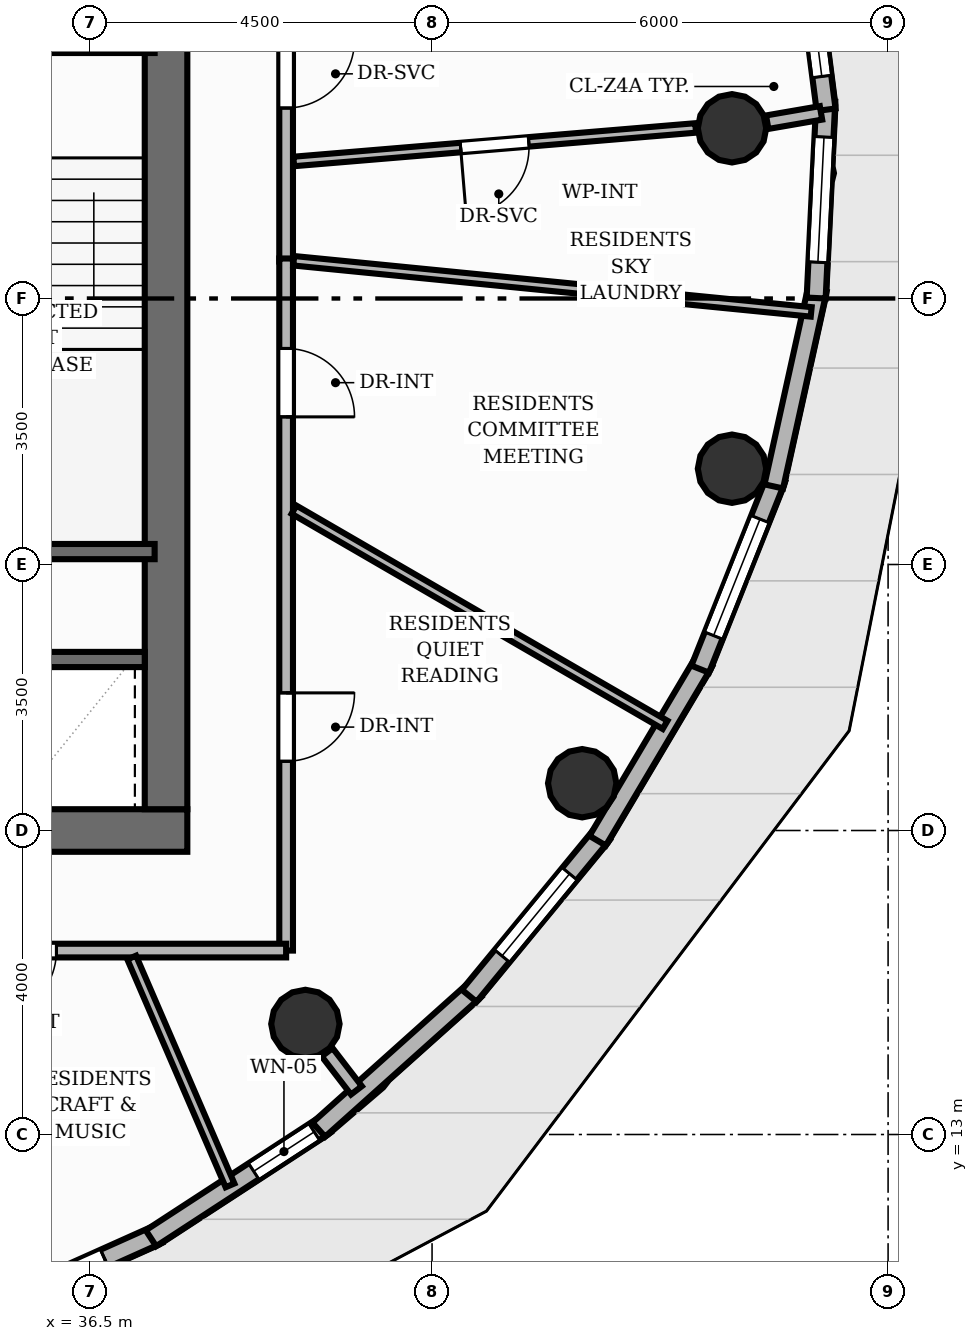
"""IFC4 building model, lengths in metres.
Left out: names, types, materials, properties, quantities, classifications, styles, units other than length and angle.
Written with IfcOpenShell. Run it as: python <this file> out.ifc"""

import sys

from ifc_helpers import new_model, si_unit, direction, frame, frame_2d, origin, origin_2d, place, context, subcontext, project, spatial, rectangle, circle, extrude, element, fill, save


model = new_model("IFC4")
c1 = context("Model", 3, precision=1e-05, world=origin(), true_north=direction((0.0, 1.0)))
c2 = subcontext(c1, "Body", "Model", "MODEL_VIEW")
j1 = project(units=[si_unit("LENGTHUNIT", "METRE"), si_unit("PLANEANGLEUNIT", "RADIAN")], contexts=[c1])
p1 = place(None, origin())
s1 = spatial("IfcSite", under=j1, at=p1, CompositionType="ELEMENT")
p2 = place(p1, origin())
s2 = spatial("IfcBuilding", under=s1, at=p2, CompositionType="ELEMENT")
p3 = place(p2, frame((0.0, 0.0, 191.84)))
s3 = spatial("IfcBuildingStorey", under=s2, at=p3, CompositionType="ELEMENT", Elevation=191.84)
p4 = place(p3, frame((26.22, 17.0, 0.0), z_axis=(0.0, 0.0, 1.0), x_axis=(1.0, 0.0, 0.0)))
e1 = element("IfcWall", 1, at=p4, inside=s3, PredefinedType="SHEAR", context=c2, shape_type="SweptSolid", body=[
    extrude(rectangle(XDim=11.56, YDim=0.56, at=frame_2d((5.78, 0.0))), origin(), (0.0, 0.0, 1.0), 3.2),
])
p5 = place(p4, frame((2.28, 0.0, 0.0)))
e2 = element("IfcOpeningElement", 2, at=p5, cuts=e1, PredefinedType="OPENING", context=c2, shape_type="SweptSolid", body=[
    extrude(rectangle(XDim=1.1, YDim=2.15, at=frame_2d((0.55, 1.075))), frame((0.0, 0.29, 0.0), z_axis=(0.0, -1.0, 0.0), x_axis=(1.0, 0.0, 0.0)), (0.0, 0.0, 1.0), 0.58),
])
p6 = place(p4, frame((5.83, 0.0, 0.0)))
e3 = element("IfcOpeningElement", 3, at=p6, cuts=e1, PredefinedType="OPENING", context=c2, shape_type="SweptSolid", body=[
    extrude(rectangle(XDim=0.9, YDim=2.1, at=frame_2d((0.45, 1.05))), frame((0.0, 0.29, 0.0), z_axis=(0.0, -1.0, 0.0), x_axis=(1.0, 0.0, 0.0)), (0.0, 0.0, 1.0), 0.58),
])
p7 = place(p3, frame((37.5, 17.28, 0.0), z_axis=(0.0, 0.0, 1.0), x_axis=(0.0, 1.0, 0.0)))
e4 = element("IfcWall", 4, at=p7, inside=s3, PredefinedType="SHEAR", context=c2, shape_type="SweptSolid", body=[
    extrude(rectangle(XDim=13.44, YDim=0.56, at=frame_2d((6.72, 0.0))), origin(), (0.0, 0.0, 1.0), 3.2),
])
for number, where, z_axis, x_axis in (
    (5, (44.946, 26.24, 0.0), (0.0, 0.0, 1.0), (1.0, 0.0, 0.0)),
    (6, (39.333, 14.455, 0.0), (0.0, 0.0, 1.0), (1.0, 0.0, 0.0)),
    (7, (42.975, 17.622, 0.0), (0.0, 0.0, 1.0), (1.0, 0.0, 0.0)),
    (8, (44.946, 21.76, 0.0), (0.0, 0.0, 1.0), (1.0, 0.0, 0.0)),
):
    element("IfcColumn", number, at=place(p3, frame(where, z_axis=z_axis, x_axis=x_axis)), inside=s3, PredefinedType="COLUMN", context=c2, shape_type="SweptSolid", body=[
        extrude(circle(Radius=0.45, at=origin_2d()), origin(), (0.0, 0.0, 1.0), 3.2),
    ])
p8 = place(p3, frame((37.397, 11.687, 0.0), z_axis=(0.0, 0.0, 1.0), x_axis=(-0.912615139532, -0.408819773368, 0.0)))
e9 = element("IfcWall", 9, at=p8, inside=s3, PredefinedType="SOLIDWALL", context=c2, shape_type="SweptSolid", body=[
    extrude(rectangle(XDim=2.702, YDim=0.25, at=frame_2d((1.351, 0.0))), origin(), (0.0, 0.0, 1.0), 2.96),
])
p9 = place(p8, frame((0.776, 0.0, 0.0)))
e10 = element("IfcOpeningElement", 10, at=p9, cuts=e9, PredefinedType="OPENING", context=c2, shape_type="SweptSolid", body=[
    extrude(rectangle(XDim=1.15, YDim=2.2, at=frame_2d((0.575, 1.1))), frame((0.0, 0.135, 0.0), z_axis=(0.0, -1.0, 0.0), x_axis=(1.0, 0.0, 0.0)), (0.0, 0.0, 1.0), 0.27),
])
p10 = place(p3, frame((39.596, 13.13, 0.0), z_axis=(0.0, 0.0, 1.0), x_axis=(-0.837860586987, -0.545884270496, 0.0)))
e11 = element("IfcWall", 11, at=p10, inside=s3, PredefinedType="SOLIDWALL", context=c2, shape_type="SweptSolid", body=[
    extrude(rectangle(XDim=2.739, YDim=0.25, at=frame_2d((1.369, 0.0))), origin(), (0.0, 0.0, 1.0), 2.96),
])
p11 = place(p10, frame((0.175, 0.0, 0.85)))
e12 = element("IfcOpeningElement", 12, at=p11, cuts=e11, PredefinedType="OPENING", context=c2, shape_type="SweptSolid", body=[
    extrude(rectangle(XDim=0.95, YDim=1.45, at=frame_2d((0.475, 0.725))), frame((0.0, 0.135, 0.0), z_axis=(0.0, -1.0, 0.0), x_axis=(1.0, 0.0, 0.0)), (0.0, 0.0, 1.0), 0.27),
])
p12 = place(p3, frame((41.564, 14.904, 0.0), z_axis=(0.0, 0.0, 1.0), x_axis=(-0.744898573364, -0.667177723998, 0.0)))
e13 = element("IfcWall", 13, at=p12, inside=s3, PredefinedType="SOLIDWALL", context=c2, shape_type="SweptSolid", body=[
    extrude(rectangle(XDim=2.758, YDim=0.25, at=frame_2d((1.379, 0.0))), origin(), (0.0, 0.0, 1.0), 2.96),
])
p13 = place(p3, frame((43.241, 16.955, 0.0), z_axis=(0.0, 0.0, 1.0), x_axis=(-0.635409334306, -0.772175483861, 0.0)))
e14 = element("IfcWall", 14, at=p13, inside=s3, PredefinedType="SOLIDWALL", context=c2, shape_type="SweptSolid", body=[
    extrude(rectangle(XDim=2.758, YDim=0.25, at=frame_2d((1.379, 0.0))), origin(), (0.0, 0.0, 1.0), 2.96),
])
p14 = place(p13, frame((0.679, 0.0, 0.85)))
e15 = element("IfcOpeningElement", 15, at=p14, cuts=e14, PredefinedType="OPENING", context=c2, shape_type="SweptSolid", body=[
    extrude(rectangle(XDim=1.4, YDim=1.55, at=frame_2d((0.7, 0.775))), frame((0.0, 0.135, 0.0), z_axis=(0.0, -1.0, 0.0), x_axis=(1.0, 0.0, 0.0)), (0.0, 0.0, 1.0), 0.27),
])
p15 = place(p3, frame((44.576, 19.221, 0.0), z_axis=(0.0, 0.0, 1.0), x_axis=(-0.510320389621, -0.859984360287, 0.0)))
e16 = element("IfcWall", 16, at=p15, inside=s3, PredefinedType="SOLIDWALL", context=c2, shape_type="SweptSolid", body=[
    extrude(rectangle(XDim=2.738, YDim=0.25, at=frame_2d((1.369, 0.0))), origin(), (0.0, 0.0, 1.0), 2.96),
])
p16 = place(p3, frame((45.528, 21.633, 0.0), z_axis=(0.0, 0.0, 1.0), x_axis=(-0.370330939431, -0.928899884433, 0.0)))
e17 = element("IfcWall", 17, at=p16, inside=s3, PredefinedType="SOLIDWALL", context=c2, shape_type="SweptSolid", body=[
    extrude(rectangle(XDim=2.702, YDim=0.25, at=frame_2d((1.351, 0.0))), origin(), (0.0, 0.0, 1.0), 2.96),
])
p17 = place(p16, frame((0.576, 0.0, 0.85)))
e18 = element("IfcOpeningElement", 18, at=p17, cuts=e17, PredefinedType="OPENING", context=c2, shape_type="SweptSolid", body=[
    extrude(rectangle(XDim=1.65, YDim=1.55, at=frame_2d((0.825, 0.775))), frame((0.0, 0.135, 0.0), z_axis=(0.0, -1.0, 0.0), x_axis=(1.0, 0.0, 0.0)), (0.0, 0.0, 1.0), 0.27),
])
p18 = place(p3, frame((46.068, 24.116, 0.0), z_axis=(0.0, 0.0, 1.0), x_axis=(-0.215877166516, -0.976420528756, 0.0)))
e19 = element("IfcWall", 19, at=p18, inside=s3, PredefinedType="SOLIDWALL", context=c2, shape_type="SweptSolid", body=[
    extrude(rectangle(XDim=2.651, YDim=0.25, at=frame_2d((1.325, 0.0))), origin(), (0.0, 0.0, 1.0), 2.96),
])
p19 = place(p3, frame((46.18, 26.595, 0.0), z_axis=(0.0, 0.0, 1.0), x_axis=(-0.048688181414, -0.99881402723, 0.0)))
e20 = element("IfcWall", 20, at=p19, inside=s3, PredefinedType="SOLIDWALL", context=c2, shape_type="SweptSolid", body=[
    extrude(rectangle(XDim=2.593, YDim=0.25, at=frame_2d((1.296, 0.0))), origin(), (0.0, 0.0, 1.0), 2.96),
])
p20 = place(p19, frame((0.471, 0.0, 0.85)))
e21 = element("IfcOpeningElement", 21, at=p20, cuts=e20, PredefinedType="OPENING", context=c2, shape_type="SweptSolid", body=[
    extrude(rectangle(XDim=1.65, YDim=1.55, at=frame_2d((0.825, 0.775))), frame((0.0, 0.135, 0.0), z_axis=(0.0, -1.0, 0.0), x_axis=(1.0, 0.0, 0.0)), (0.0, 0.0, 1.0), 0.27),
])
p21 = place(p3, frame((45.86, 28.995, 0.0), z_axis=(0.0, 0.0, 1.0), x_axis=(0.128057007482, -0.991766808698, 0.0)))
e22 = element("IfcWall", 22, at=p21, inside=s3, PredefinedType="SOLIDWALL", context=c2, shape_type="SweptSolid", body=[
    extrude(rectangle(XDim=2.532, YDim=0.25, at=frame_2d((1.266, 0.0))), origin(), (0.0, 0.0, 1.0), 2.96),
])
p22 = place(p21, frame((0.441, 0.0, 0.85)))
e23 = element("IfcOpeningElement", 23, at=p22, cuts=e22, PredefinedType="OPENING", context=c2, shape_type="SweptSolid", body=[
    extrude(rectangle(XDim=1.65, YDim=1.55, at=frame_2d((0.825, 0.775))), frame((0.0, 0.135, 0.0), z_axis=(0.0, -1.0, 0.0), x_axis=(1.0, 0.0, 0.0)), (0.0, 0.0, 1.0), 0.27),
])
p23 = place(p3, frame((34.11, 20.67, 0.0), z_axis=(0.0, 0.0, 1.0), x_axis=(1.0, 0.0, 0.0)))
e24 = element("IfcWall", 24, at=p23, inside=s3, PredefinedType="SHEAR", context=c2, shape_type="SweptSolid", body=[
    extrude(rectangle(XDim=3.24, YDim=0.2, at=frame_2d((1.62, 0.0))), origin(), (0.0, 0.0, 1.0), 3.2),
])
p24 = place(p3, frame((34.11, 27.33, 0.0), z_axis=(0.0, 0.0, 1.0), x_axis=(1.0, 0.0, 0.0)))
e25 = element("IfcWall", 25, at=p24, inside=s3, PredefinedType="SHEAR", context=c2, shape_type="SweptSolid", body=[
    extrude(rectangle(XDim=3.24, YDim=0.2, at=frame_2d((1.62, 0.0))), origin(), (0.0, 0.0, 1.0), 3.2),
])
p25 = place(p24, frame((1.135, 0.0, 0.0)))
e26 = element("IfcOpeningElement", 26, at=p25, cuts=e25, PredefinedType="OPENING", context=c2, shape_type="SweptSolid", body=[
    extrude(rectangle(XDim=1.05, YDim=2.15, at=frame_2d((0.525, 1.075))), frame((0.0, 0.11, 0.0), z_axis=(0.0, -1.0, 0.0), x_axis=(1.0, 0.0, 0.0)), (0.0, 0.0, 1.0), 0.22),
])
p26 = place(p3, frame((33.5, 19.25, 0.0), z_axis=(0.0, 0.0, 1.0), x_axis=(1.0, 0.0, 0.0)))
e27 = element("IfcWall", 27, at=p26, inside=s3, PredefinedType="SHEAR", context=c2, shape_type="SweptSolid", body=[
    extrude(rectangle(XDim=3.72, YDim=0.2, at=frame_2d((1.86, 0.0))), origin(), (0.0, 0.0, 1.0), 3.2),
])
p27 = place(p3, frame((45.409, 26.32, 0.0), z_axis=(0.0, 0.0, 1.0), x_axis=(0.985336223431, 0.170623933826, 0.0)))
e28 = element("IfcWall", 28, at=p27, inside=s3, PredefinedType="PARTITIONING", context=c2, shape_type="SweptSolid", body=[
    extrude(rectangle(XDim=0.718, YDim=0.18, at=frame_2d((0.359, 0.0))), origin(), (0.0, 0.0, 1.0), 2.403),
])
p28 = place(p3, frame((39.62, 14.082, 0.0), z_axis=(0.0, 0.0, 1.0), x_axis=(0.609112888366, -0.793083532314, 0.0)))
e29 = element("IfcWall", 29, at=p28, inside=s3, PredefinedType="PARTITIONING", context=c2, shape_type="SweptSolid", body=[
    extrude(rectangle(XDim=0.632, YDim=0.18, at=frame_2d((0.316, 0.0))), origin(), (0.0, 0.0, 1.0), 2.403),
])
p29 = place(p3, frame((39.08, 32.58, 0.0), z_axis=(0.0, 0.0, 1.0), x_axis=(0.0, -1.0, 0.0)))
e30 = element("IfcWall", 30, at=p29, inside=s3, PredefinedType="PARTITIONING", context=c2, shape_type="SweptSolid", body=[
    extrude(rectangle(XDim=8.094, YDim=0.18, at=frame_2d((4.047, 0.0))), origin(), (0.0, 0.0, 1.0), 2.955),
])
p30 = place(p29, frame((5.174, 0.0, 0.0)))
e31 = element("IfcOpeningElement", 31, at=p30, cuts=e30, PredefinedType="OPENING", context=c2, shape_type="SweptSolid", body=[
    extrude(rectangle(XDim=0.9, YDim=2.1, at=frame_2d((0.45, 1.05))), frame((0.0, 0.1, 0.0), z_axis=(0.0, -1.0, 0.0), x_axis=(1.0, 0.0, 0.0)), (0.0, 0.0, 1.0), 0.2),
])
p31 = place(p3, frame((39.08, 24.526, 0.0), z_axis=(0.0, 0.0, 1.0), x_axis=(0.0, -1.0, 0.0)))
e32 = element("IfcWall", 32, at=p31, inside=s3, PredefinedType="PARTITIONING", context=c2, shape_type="SweptSolid", body=[
    extrude(rectangle(XDim=9.106, YDim=0.18, at=frame_2d((4.553, 0.0))), origin(), (0.0, 0.0, 1.0), 2.955),
])
p32 = place(p31, frame((1.184, 0.0, 0.0)))
e33 = element("IfcOpeningElement", 33, at=p32, cuts=e32, PredefinedType="OPENING", context=c2, shape_type="SweptSolid", body=[
    extrude(rectangle(XDim=0.9, YDim=2.1, at=frame_2d((0.45, 1.05))), frame((0.0, 0.1, 0.0), z_axis=(0.0, -1.0, 0.0), x_axis=(1.0, 0.0, 0.0)), (0.0, 0.0, 1.0), 0.2),
])
p33 = place(p31, frame((5.716, 0.0, 0.0)))
e34 = element("IfcOpeningElement", 34, at=p33, cuts=e32, PredefinedType="OPENING", context=c2, shape_type="SweptSolid", body=[
    extrude(rectangle(XDim=0.9, YDim=2.1, at=frame_2d((0.45, 1.05))), frame((0.0, 0.1, 0.0), z_axis=(0.0, -1.0, 0.0), x_axis=(1.0, 0.0, 0.0)), (0.0, 0.0, 1.0), 0.2),
])
p34 = place(p3, frame((39.08, 15.42, 0.0), z_axis=(0.0, 0.0, 1.0), x_axis=(-1.0, 0.0, 0.0)))
e35 = element("IfcWall", 35, at=p34, inside=s3, PredefinedType="PARTITIONING", context=c2, shape_type="SweptSolid", body=[
    extrude(rectangle(XDim=10.594, YDim=0.18, at=frame_2d((5.297, 0.0))), origin(), (0.0, 0.0, 1.0), 2.955),
])
p35 = place(p34, frame((3.021, 0.0, 0.0)))
e36 = element("IfcOpeningElement", 36, at=p35, cuts=e35, PredefinedType="OPENING", context=c2, shape_type="SweptSolid", body=[
    extrude(rectangle(XDim=0.9, YDim=2.1, at=frame_2d((0.45, 1.05))), frame((0.0, 0.1, 0.0), z_axis=(0.0, -1.0, 0.0), x_axis=(1.0, 0.0, 0.0)), (0.0, 0.0, 1.0), 0.2),
])
p36 = place(p34, frame((6.508, 0.0, 0.0)))
e37 = element("IfcOpeningElement", 37, at=p36, cuts=e35, PredefinedType="OPENING", context=c2, shape_type="SweptSolid", body=[
    extrude(rectangle(XDim=0.9, YDim=2.1, at=frame_2d((0.45, 1.05))), frame((0.0, 0.1, 0.0), z_axis=(0.0, -1.0, 0.0), x_axis=(1.0, 0.0, 0.0)), (0.0, 0.0, 1.0), 0.2),
])
p37 = place(p3, frame((44.468, 26.244, 0.0), z_axis=(0.0, 0.0, 1.0), x_axis=(-0.996538774807, -0.083129238578, 0.0)))
e38 = element("IfcWall", 38, at=p37, inside=s3, PredefinedType="PARTITIONING", context=c2, shape_type="SweptSolid", body=[
    extrude(rectangle(XDim=5.307, YDim=0.125, at=frame_2d((2.653, 0.0))), origin(), (0.0, 0.0, 1.0), 2.403),
])
p38 = place(p37, frame((2.204, 0.0, 0.0)))
e39 = element("IfcOpeningElement", 39, at=p38, cuts=e38, PredefinedType="OPENING", context=c2, shape_type="SweptSolid", body=[
    extrude(rectangle(XDim=0.9, YDim=2.1, at=frame_2d((0.45, 1.05))), frame((0.0, 0.073, 0.0), z_axis=(0.0, -1.0, 0.0), x_axis=(1.0, 0.0, 0.0)), (0.0, 0.0, 1.0), 0.145),
])
p39 = place(p3, frame((44.066, 18.39, 0.0), z_axis=(0.0, 0.0, 1.0), x_axis=(-0.865092390625, 0.501612555348, 0.0)))
e40 = element("IfcWall", 40, at=p39, inside=s3, PredefinedType="PARTITIONING", context=c2, shape_type="SweptSolid", body=[
    extrude(rectangle(XDim=5.643, YDim=0.125, at=frame_2d((2.822, 0.0))), origin(), (0.0, 0.0, 1.0), 2.692),
])
p40 = place(p3, frame((39.179, 24.497, 0.0), z_axis=(0.0, 0.0, 1.0), x_axis=(0.995152744832, -0.098341316102, 0.0)))
e41 = element("IfcWall", 41, at=p40, inside=s3, PredefinedType="PARTITIONING", context=c2, shape_type="SweptSolid", body=[
    extrude(rectangle(XDim=6.842, YDim=0.125, at=frame_2d((3.421, 0.0))), origin(), (0.0, 0.0, 1.0), 2.692),
])
p41 = place(p3, frame((38.342, 12.331, 0.0), z_axis=(0.0, 0.0, 1.0), x_axis=(-0.396192482216, 0.918167477662, 0.0)))
e42 = element("IfcWall", 42, at=p41, inside=s3, PredefinedType="PARTITIONING", context=c2, shape_type="SweptSolid", body=[
    extrude(rectangle(XDim=3.265, YDim=0.125, at=frame_2d((1.632, 0.0))), origin(), (0.0, 0.0, 1.0), 2.692),
])
p42 = place(p9, origin())
e43 = element("IfcDoor", 43, at=p42, inside=s3, OperationType="SINGLE_SWING_LEFT", PredefinedType="DOOR", context=c2, shape_type="SweptSolid", body=[
    extrude(rectangle(XDim=1.15, YDim=2.2, at=frame_2d((0.575, 1.1))), frame((0.0, 0.025, 0.0), z_axis=(0.0, -1.0, 0.0), x_axis=(1.0, 0.0, 0.0)), (0.0, 0.0, 1.0), 0.05),
])
fill(e10, e43)
p43 = place(p11, origin())
e44 = element("IfcWindow", 44, at=p43, inside=s3, PartitioningType="SINGLE_PANEL", PredefinedType="WINDOW", context=c2, shape_type="SweptSolid", body=[
    extrude(rectangle(XDim=0.95, YDim=1.45, at=frame_2d((0.475, 0.725))), frame((0.0, 0.03, 0.0), z_axis=(0.0, -1.0, 0.0), x_axis=(1.0, 0.0, 0.0)), (0.0, 0.0, 1.0), 0.06),
])
fill(e12, e44)
p44 = place(p14, origin())
e45 = element("IfcWindow", 45, at=p44, inside=s3, PartitioningType="SINGLE_PANEL", PredefinedType="WINDOW", context=c2, shape_type="SweptSolid", body=[
    extrude(rectangle(XDim=1.4, YDim=1.55, at=frame_2d((0.7, 0.775))), frame((0.0, 0.03, 0.0), z_axis=(0.0, -1.0, 0.0), x_axis=(1.0, 0.0, 0.0)), (0.0, 0.0, 1.0), 0.06),
])
fill(e15, e45)
p45 = place(p17, origin())
e46 = element("IfcWindow", 46, at=p45, inside=s3, PartitioningType="SINGLE_PANEL", PredefinedType="WINDOW", context=c2, shape_type="SweptSolid", body=[
    extrude(rectangle(XDim=1.65, YDim=1.55, at=frame_2d((0.825, 0.775))), frame((0.0, 0.03, 0.0), z_axis=(0.0, -1.0, 0.0), x_axis=(1.0, 0.0, 0.0)), (0.0, 0.0, 1.0), 0.06),
])
fill(e18, e46)
p46 = place(p20, origin())
e47 = element("IfcWindow", 47, at=p46, inside=s3, PartitioningType="SINGLE_PANEL", PredefinedType="WINDOW", context=c2, shape_type="SweptSolid", body=[
    extrude(rectangle(XDim=1.65, YDim=1.55, at=frame_2d((0.825, 0.775))), frame((0.0, 0.03, 0.0), z_axis=(0.0, -1.0, 0.0), x_axis=(1.0, 0.0, 0.0)), (0.0, 0.0, 1.0), 0.06),
])
fill(e21, e47)
p47 = place(p22, origin())
e48 = element("IfcWindow", 48, at=p47, inside=s3, PartitioningType="SINGLE_PANEL", PredefinedType="WINDOW", context=c2, shape_type="SweptSolid", body=[
    extrude(rectangle(XDim=1.65, YDim=1.55, at=frame_2d((0.825, 0.775))), frame((0.0, 0.03, 0.0), z_axis=(0.0, -1.0, 0.0), x_axis=(1.0, 0.0, 0.0)), (0.0, 0.0, 1.0), 0.06),
])
fill(e23, e48)
p48 = place(p30, origin())
e49 = element("IfcDoor", 49, at=p48, inside=s3, OperationType="SINGLE_SWING_LEFT", PredefinedType="DOOR", context=c2, shape_type="SweptSolid", body=[
    extrude(rectangle(XDim=0.9, YDim=2.1, at=frame_2d((0.45, 1.05))), frame((0.0, 0.025, 0.0), z_axis=(0.0, -1.0, 0.0), x_axis=(1.0, 0.0, 0.0)), (0.0, 0.0, 1.0), 0.05),
])
fill(e31, e49)
p49 = place(p32, origin())
e50 = element("IfcDoor", 50, at=p49, inside=s3, OperationType="SINGLE_SWING_RIGHT", PredefinedType="DOOR", context=c2, shape_type="SweptSolid", body=[
    extrude(rectangle(XDim=0.9, YDim=2.1, at=frame_2d((0.45, 1.05))), frame((0.0, 0.025, 0.0), z_axis=(0.0, -1.0, 0.0), x_axis=(1.0, 0.0, 0.0)), (0.0, 0.0, 1.0), 0.05),
])
fill(e33, e50)
p50 = place(p33, origin())
e51 = element("IfcDoor", 51, at=p50, inside=s3, OperationType="SINGLE_SWING_LEFT", PredefinedType="DOOR", context=c2, shape_type="SweptSolid", body=[
    extrude(rectangle(XDim=0.9, YDim=2.1, at=frame_2d((0.45, 1.05))), frame((0.0, 0.025, 0.0), z_axis=(0.0, -1.0, 0.0), x_axis=(1.0, 0.0, 0.0)), (0.0, 0.0, 1.0), 0.05),
])
fill(e34, e51)
p51 = place(p35, origin())
e52 = element("IfcDoor", 52, at=p51, inside=s3, OperationType="SINGLE_SWING_RIGHT", PredefinedType="DOOR", context=c2, shape_type="SweptSolid", body=[
    extrude(rectangle(XDim=0.9, YDim=2.1, at=frame_2d((0.45, 1.05))), frame((0.0, 0.025, 0.0), z_axis=(0.0, -1.0, 0.0), x_axis=(1.0, 0.0, 0.0)), (0.0, 0.0, 1.0), 0.05),
])
fill(e36, e52)
p52 = place(p38, origin())
e53 = element("IfcDoor", 53, at=p52, inside=s3, OperationType="SINGLE_SWING_RIGHT", PredefinedType="DOOR", context=c2, shape_type="SweptSolid", body=[
    extrude(rectangle(XDim=0.9, YDim=2.1, at=frame_2d((0.45, 1.05))), frame((0.0, 0.025, 0.0), z_axis=(0.0, -1.0, 0.0), x_axis=(1.0, 0.0, 0.0)), (0.0, 0.0, 1.0), 0.05),
])
fill(e39, e53)
save(model, sys.argv[1])
